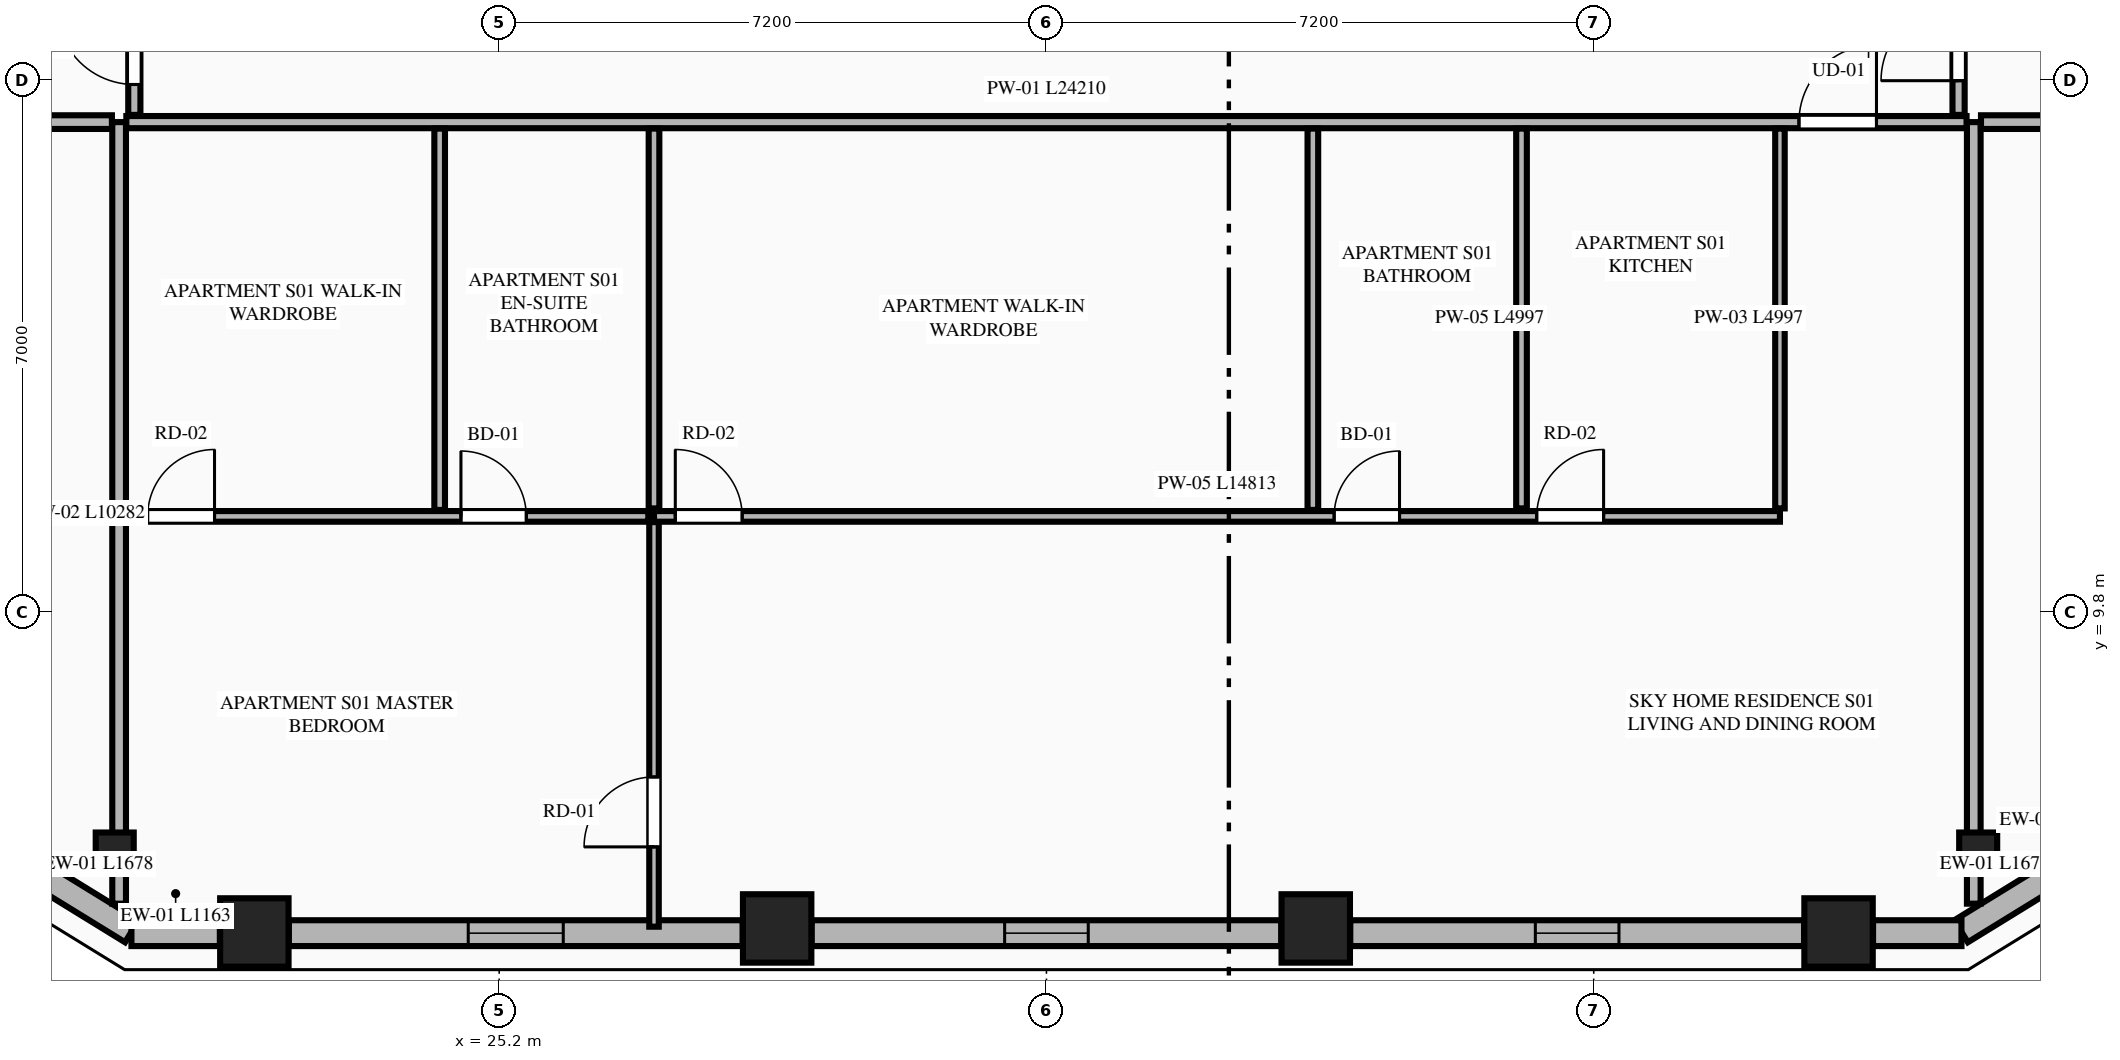
"""IFC4 building model, lengths in metres.
Left out: names, types, materials, properties, quantities, classifications, styles, units other than length and angle.
Written with IfcOpenShell. Run it as: python <this file> out.ifc"""

import sys

from ifc_helpers import new_model, si_unit, direction, frame, frame_2d, origin, origin_2d, place, context, subcontext, project, spatial, rectangle, extrude, element, fill, save


model = new_model("IFC4")
c1 = context("Model", 3, precision=1e-05, world=origin(), true_north=direction((0.0, 1.0)))
c2 = subcontext(c1, "Body", "Model", "MODEL_VIEW")
j1 = project(units=[si_unit("LENGTHUNIT", "METRE"), si_unit("PLANEANGLEUNIT", "RADIAN")], contexts=[c1])
p1 = place(None, origin())
s1 = spatial("IfcSite", under=j1, at=p1, CompositionType="ELEMENT")
p2 = place(p1, origin())
s2 = spatial("IfcBuilding", under=s1, at=p2, CompositionType="ELEMENT")
p3 = place(p2, frame((0.0, 0.0, 193.2)))
s3 = spatial("IfcBuildingStorey", under=s2, at=p3, CompositionType="ELEMENT", Elevation=193.2)
for number, where, z_axis, x_axis in (
    (1, (21.979, 5.589, 0.0), (0.0, 0.0, 1.0), (1.0, 0.0, 0.0)),
    (2, (28.857, 5.642, 0.0), (0.0, 0.0, 1.0), (1.0, 0.0, 0.0)),
    (3, (35.943, 5.642, 0.0), (0.0, 0.0, 1.0), (1.0, 0.0, 0.0)),
    (4, (42.821, 5.589, 0.0), (0.0, 0.0, 1.0), (1.0, 0.0, 0.0)),
):
    element("IfcColumn", number, at=place(p3, frame(where, z_axis=z_axis, x_axis=x_axis)), inside=s3, PredefinedType="COLUMN", context=c2, shape_type="SweptSolid", body=[
        extrude(rectangle(XDim=0.9, YDim=0.9, at=origin_2d()), origin(), (0.0, 0.0, 1.0), 3.55),
    ])
for number, where, z_axis, x_axis in (
    (5, (20.142, 6.654, 0.0), (0.0, 0.0, 1.0), (0.865, -0.501, 0.0)),
    (6, (44.658, 6.654, 0.0), (0.0, 0.0, 1.0), (0.865, 0.501, 0.0)),
):
    element("IfcColumn", number, at=place(p3, frame(where, z_axis=z_axis, x_axis=x_axis)), inside=s3, PredefinedType="PILASTER", context=c2, shape_type="SweptSolid", body=[
        extrude(rectangle(XDim=0.5, YDim=0.35, at=origin_2d()), origin(), (0.0, 0.0, 1.0), 3.55),
    ])
for number, where, z_axis, x_axis in (
    (7, (18.938, 6.484, 0.0), (0.0, 0.0, 1.0), (0.852, -0.524, 0.0)),
    (8, (44.433, 5.605, 0.0), (0.0, 0.0, 1.0), (0.852, 0.524, 0.0)),
):
    element("IfcWall", number, at=place(p3, frame(where, z_axis=z_axis, x_axis=x_axis)), inside=s3, PredefinedType="STANDARD", context=c2, shape_type="SweptSolid", body=[
        extrude(rectangle(XDim=1.678, YDim=0.34, at=frame_2d((0.839, 0.0))), origin(), (0.0, 0.0, 1.0), 3.35),
    ])
p4 = place(p3, frame((20.362, 5.58, 0.0), z_axis=(0.0, 0.0, 1.0), x_axis=(1.0, 0.0, 0.0)))
e9 = element("IfcWall", 9, at=p4, inside=s3, PredefinedType="STANDARD", context=c2, shape_type="SweptSolid", body=[
    extrude(rectangle(XDim=1.163, YDim=0.34, at=frame_2d((0.582, 0.0))), origin(), (0.0, 0.0, 1.0), 3.35),
])
p5 = place(p3, frame((22.433, 5.58, 0.0), z_axis=(0.0, 0.0, 1.0), x_axis=(1.0, 0.0, 0.0)))
e10 = element("IfcWall", 10, at=p5, inside=s3, PredefinedType="STANDARD", context=c2, shape_type="SweptSolid", body=[
    extrude(rectangle(XDim=5.97, YDim=0.34, at=frame_2d((2.985, 0.0))), origin(), (0.0, 0.0, 1.0), 2.883),
])
p6 = place(p5, frame((2.36, 0.0, 0.75)))
e11 = element("IfcOpeningElement", 11, at=p6, cuts=e10, PredefinedType="OPENING", context=c2, shape_type="SweptSolid", body=[
    extrude(rectangle(XDim=1.25, YDim=1.95, at=frame_2d((0.625, 0.975))), frame((0.0, 0.18, 0.0), z_axis=(0.0, -1.0, 0.0), x_axis=(1.0, 0.0, 0.0)), (0.0, 0.0, 1.0), 0.36),
])
p7 = place(p3, frame((29.311, 5.58, 0.0), z_axis=(0.0, 0.0, 1.0), x_axis=(1.0, 0.0, 0.0)))
e12 = element("IfcWall", 12, at=p7, inside=s3, PredefinedType="STANDARD", context=c2, shape_type="SweptSolid", body=[
    extrude(rectangle(XDim=6.178, YDim=0.34, at=frame_2d((3.089, 0.0))), origin(), (0.0, 0.0, 1.0), 2.883),
])
p8 = place(p7, frame((2.539, 0.0, 0.75)))
e13 = element("IfcOpeningElement", 13, at=p8, cuts=e12, PredefinedType="OPENING", context=c2, shape_type="SweptSolid", body=[
    extrude(rectangle(XDim=1.1, YDim=1.983, at=frame_2d((0.55, 0.991))), frame((0.0, 0.18, 0.0), z_axis=(0.0, -1.0, 0.0), x_axis=(1.0, 0.0, 0.0)), (0.0, 0.0, 1.0), 0.36),
])
p9 = place(p3, frame((36.397, 5.58, 0.0), z_axis=(0.0, 0.0, 1.0), x_axis=(1.0, 0.0, 0.0)))
e14 = element("IfcWall", 14, at=p9, inside=s3, PredefinedType="STANDARD", context=c2, shape_type="SweptSolid", body=[
    extrude(rectangle(XDim=5.97, YDim=0.34, at=frame_2d((2.985, 0.0))), origin(), (0.0, 0.0, 1.0), 2.883),
])
p10 = place(p9, frame((2.435, 0.0, 0.75)))
e15 = element("IfcOpeningElement", 15, at=p10, cuts=e14, PredefinedType="OPENING", context=c2, shape_type="SweptSolid", body=[
    extrude(rectangle(XDim=1.1, YDim=1.983, at=frame_2d((0.55, 0.991))), frame((0.0, 0.18, 0.0), z_axis=(0.0, -1.0, 0.0), x_axis=(1.0, 0.0, 0.0)), (0.0, 0.0, 1.0), 0.36),
])
p11 = place(p3, frame((43.275, 5.58, 0.0), z_axis=(0.0, 0.0, 1.0), x_axis=(1.0, 0.0, 0.0)))
e16 = element("IfcWall", 16, at=p11, inside=s3, PredefinedType="STANDARD", context=c2, shape_type="SweptSolid", body=[
    extrude(rectangle(XDim=1.163, YDim=0.34, at=frame_2d((0.582, 0.0))), origin(), (0.0, 0.0, 1.0), 3.35),
])
for number, where, z_axis, x_axis in (
    (17, (20.2, 5.968, 0.0), (0.0, 0.0, 1.0), (0.0, 1.0, 0.0)),
    (18, (44.6, 5.968, 0.0), (0.0, 0.0, 1.0), (0.0, 1.0, 0.0)),
):
    element("IfcWall", number, at=place(p3, frame(where, z_axis=z_axis, x_axis=x_axis)), inside=s3, PredefinedType="PARTITIONING", context=c2, shape_type="SweptSolid", body=[
        extrude(rectangle(XDim=10.282, YDim=0.18, at=frame_2d((5.141, 0.0))), origin(), (0.0, 0.0, 1.0), 3.35),
    ])
p12 = place(p3, frame((20.295, 16.25, 0.0), z_axis=(0.0, 0.0, 1.0), x_axis=(1.0, 0.0, 0.0)))
e19 = element("IfcWall", 19, at=p12, inside=s3, PredefinedType="PARTITIONING", context=c2, shape_type="SweptSolid", body=[
    extrude(rectangle(XDim=24.21, YDim=0.16, at=frame_2d((12.105, 0.0))), origin(), (0.0, 0.0, 1.0), 3.35),
])
p13 = place(p12, frame((22.005, 0.0, 0.0)))
e20 = element("IfcOpeningElement", 20, at=p13, cuts=e19, PredefinedType="OPENING", context=c2, shape_type="SweptSolid", body=[
    extrude(rectangle(XDim=1.02, YDim=2.25, at=frame_2d((0.51, 1.125))), frame((0.0, 0.09, 0.0), z_axis=(0.0, -1.0, 0.0), x_axis=(1.0, 0.0, 0.0)), (0.0, 0.0, 1.0), 0.18),
])
p14 = place(p3, frame((42.05, 11.168, 0.0), z_axis=(0.0, 0.0, 1.0), x_axis=(0.0, 1.0, 0.0)))
e21 = element("IfcWall", 21, at=p14, inside=s3, PredefinedType="PARTITIONING", context=c2, shape_type="SweptSolid", body=[
    extrude(rectangle(XDim=4.997, YDim=0.125, at=frame_2d((2.499, 0.0))), origin(), (0.0, 0.0, 1.0), 2.807),
])
p15 = place(p3, frame((27.237, 11.063, 0.0), z_axis=(0.0, 0.0, 1.0), x_axis=(1.0, 0.0, 0.0)))
e22 = element("IfcWall", 22, at=p15, inside=s3, PredefinedType="PLUMBINGWALL", context=c2, shape_type="SweptSolid", body=[
    extrude(rectangle(XDim=14.813, YDim=0.14, at=frame_2d((7.406, 0.0))), origin(), (0.0, 0.0, 1.0), 3.35),
])
p16 = place(p15, frame((0.28, 0.0, 0.0)))
e23 = element("IfcOpeningElement", 23, at=p16, cuts=e22, PredefinedType="OPENING", context=c2, shape_type="SweptSolid", body=[
    extrude(rectangle(XDim=0.88, YDim=2.15, at=frame_2d((0.44, 1.075))), frame((0.0, 0.08, 0.0), z_axis=(0.0, -1.0, 0.0), x_axis=(1.0, 0.0, 0.0)), (0.0, 0.0, 1.0), 0.16),
])
p17 = place(p15, frame((8.948, 0.0, 0.0)))
e24 = element("IfcOpeningElement", 24, at=p17, cuts=e22, PredefinedType="OPENING", context=c2, shape_type="SweptSolid", body=[
    extrude(rectangle(XDim=0.86, YDim=2.1, at=frame_2d((0.43, 1.05))), frame((0.0, 0.08, 0.0), z_axis=(0.0, -1.0, 0.0), x_axis=(1.0, 0.0, 0.0)), (0.0, 0.0, 1.0), 0.16),
])
p18 = place(p15, frame((11.613, 0.0, 0.0)))
e25 = element("IfcOpeningElement", 25, at=p18, cuts=e22, PredefinedType="OPENING", context=c2, shape_type="SweptSolid", body=[
    extrude(rectangle(XDim=0.88, YDim=2.15, at=frame_2d((0.44, 1.075))), frame((0.0, 0.08, 0.0), z_axis=(0.0, -1.0, 0.0), x_axis=(1.0, 0.0, 0.0)), (0.0, 0.0, 1.0), 0.16),
])
p19 = place(p3, frame((20.295, 11.063, 0.0), z_axis=(0.0, 0.0, 1.0), x_axis=(1.0, 0.0, 0.0)))
e26 = element("IfcWall", 26, at=p19, inside=s3, PredefinedType="PLUMBINGWALL", context=c2, shape_type="SweptSolid", body=[
    extrude(rectangle(XDim=6.867, YDim=0.14, at=frame_2d((3.434, 0.0))), origin(), (0.0, 0.0, 1.0), 3.35),
])
p20 = place(p19, frame((0.28, 0.0, 0.0)))
e27 = element("IfcOpeningElement", 27, at=p20, cuts=e26, PredefinedType="OPENING", context=c2, shape_type="SweptSolid", body=[
    extrude(rectangle(XDim=0.88, YDim=2.15, at=frame_2d((0.44, 1.075))), frame((0.0, 0.08, 0.0), z_axis=(0.0, -1.0, 0.0), x_axis=(1.0, 0.0, 0.0)), (0.0, 0.0, 1.0), 0.16),
])
p21 = place(p19, frame((4.402, 0.0, 0.0)))
e28 = element("IfcOpeningElement", 28, at=p21, cuts=e26, PredefinedType="OPENING", context=c2, shape_type="SweptSolid", body=[
    extrude(rectangle(XDim=0.86, YDim=2.1, at=frame_2d((0.43, 1.05))), frame((0.0, 0.08, 0.0), z_axis=(0.0, -1.0, 0.0), x_axis=(1.0, 0.0, 0.0)), (0.0, 0.0, 1.0), 0.16),
])
for number, where, z_axis, x_axis in (
    (29, (38.65, 11.168, 0.0), (0.0, 0.0, 1.0), (0.0, 1.0, 0.0)),
    (30, (27.237, 11.168, 0.0), (0.0, 0.0, 1.0), (0.0, 1.0, 0.0)),
):
    element("IfcWall", number, at=place(p3, frame(where, z_axis=z_axis, x_axis=x_axis)), inside=s3, PredefinedType="PLUMBINGWALL", context=c2, shape_type="SweptSolid", body=[
        extrude(rectangle(XDim=4.997, YDim=0.14, at=frame_2d((2.499, 0.0))), origin(), (0.0, 0.0, 1.0), 3.35),
    ])
p22 = place(p3, frame((27.237, 5.665, 0.0), z_axis=(0.0, 0.0, 1.0), x_axis=(0.0, 1.0, 0.0)))
e31 = element("IfcWall", 31, at=p22, inside=s3, PredefinedType="PARTITIONING", context=c2, shape_type="SweptSolid", body=[
    extrude(rectangle(XDim=5.323, YDim=0.125, at=frame_2d((2.662, 0.0))), origin(), (0.0, 0.0, 1.0), 3.35),
])
p23 = place(p22, frame((1.05, 0.0, 0.0)))
e32 = element("IfcOpeningElement", 32, at=p23, cuts=e31, PredefinedType="OPENING", context=c2, shape_type="SweptSolid", body=[
    extrude(rectangle(XDim=0.92, YDim=2.15, at=frame_2d((0.46, 1.075))), frame((0.0, 0.073, 0.0), z_axis=(0.0, -1.0, 0.0), x_axis=(1.0, 0.0, 0.0)), (0.0, 0.0, 1.0), 0.145),
])
p24 = place(p3, frame((35.905, 11.148, 0.0), z_axis=(0.0, 0.0, 1.0), x_axis=(0.0, 1.0, 0.0)))
e33 = element("IfcWall", 33, at=p24, inside=s3, PredefinedType="PLUMBINGWALL", context=c2, shape_type="SweptSolid", body=[
    extrude(rectangle(XDim=5.017, YDim=0.14, at=frame_2d((2.509, 0.0))), origin(), (0.0, 0.0, 1.0), 2.807),
])
p25 = place(p3, frame((24.417, 11.148, 0.0), z_axis=(0.0, 0.0, 1.0), x_axis=(0.0, 1.0, 0.0)))
e34 = element("IfcWall", 34, at=p25, inside=s3, PredefinedType="PLUMBINGWALL", context=c2, shape_type="SweptSolid", body=[
    extrude(rectangle(XDim=5.017, YDim=0.14, at=frame_2d((2.509, 0.0))), origin(), (0.0, 0.0, 1.0), 3.35),
])
for number, where, z_axis, x_axis in (
    (35, (14.211, 16.25, 0.0), (0.0, 0.0, 1.0), (1.0, 0.0, 0.0)),
    (36, (44.695, 16.25, 0.0), (0.0, 0.0, 1.0), (1.0, 0.0, 0.0)),
):
    element("IfcWall", number, at=place(p3, frame(where, z_axis=z_axis, x_axis=x_axis)), inside=s3, PredefinedType="PARTITIONING", context=c2, shape_type="SweptSolid", body=[
        extrude(rectangle(XDim=5.894, YDim=0.18, at=frame_2d((2.947, 0.0))), origin(), (0.0, 0.0, 1.0), 3.35),
    ])
p26 = place(p3, frame((20.4, 16.345, 0.0), z_axis=(0.0, 0.0, 1.0), x_axis=(0.0, 1.0, 0.0)))
e37 = element("IfcWall", 37, at=p26, inside=s3, PredefinedType="PARTITIONING", context=c2, shape_type="SweptSolid", body=[
    extrude(rectangle(XDim=10.016, YDim=0.16, at=frame_2d((5.008, 0.0))), origin(), (0.0, 0.0, 1.0), 3.35),
])
p27 = place(p26, frame((0.4, 0.0, 0.0)))
e38 = element("IfcOpeningElement", 38, at=p27, cuts=e37, PredefinedType="OPENING", context=c2, shape_type="SweptSolid", body=[
    extrude(rectangle(XDim=1.02, YDim=2.25, at=frame_2d((0.51, 1.125))), frame((0.0, 0.09, 0.0), z_axis=(0.0, -1.0, 0.0), x_axis=(1.0, 0.0, 0.0)), (0.0, 0.0, 1.0), 0.18),
])
p28 = place(p3, frame((44.4, 16.345, 0.0), z_axis=(0.0, 0.0, 1.0), x_axis=(0.0, 1.0, 0.0)))
e39 = element("IfcWall", 39, at=p28, inside=s3, PredefinedType="PARTITIONING", context=c2, shape_type="SweptSolid", body=[
    extrude(rectangle(XDim=18.71, YDim=0.16, at=frame_2d((9.355, 0.0))), origin(), (0.0, 0.0, 1.0), 3.35),
])
p29 = place(p28, frame((0.45, 0.0, 0.0)))
e40 = element("IfcOpeningElement", 40, at=p29, cuts=e39, PredefinedType="OPENING", context=c2, shape_type="SweptSolid", body=[
    extrude(rectangle(XDim=1.02, YDim=2.25, at=frame_2d((0.51, 1.125))), frame((0.0, 0.09, 0.0), z_axis=(0.0, -1.0, 0.0), x_axis=(1.0, 0.0, 0.0)), (0.0, 0.0, 1.0), 0.18),
])
p30 = place(p6, origin())
e41 = element("IfcWindow", 41, at=p30, inside=s3, PartitioningType="SINGLE_PANEL", PredefinedType="WINDOW", context=c2, shape_type="SweptSolid", body=[
    extrude(rectangle(XDim=1.25, YDim=1.95, at=frame_2d((0.625, 0.975))), frame((0.0, 0.03, 0.0), z_axis=(0.0, -1.0, 0.0), x_axis=(1.0, 0.0, 0.0)), (0.0, 0.0, 1.0), 0.06),
])
fill(e11, e41)
p31 = place(p8, origin())
e42 = element("IfcWindow", 42, at=p31, inside=s3, PartitioningType="SINGLE_PANEL", PredefinedType="WINDOW", context=c2, shape_type="SweptSolid", body=[
    extrude(rectangle(XDim=1.1, YDim=1.983, at=frame_2d((0.55, 0.991))), frame((0.0, 0.03, 0.0), z_axis=(0.0, -1.0, 0.0), x_axis=(1.0, 0.0, 0.0)), (0.0, 0.0, 1.0), 0.06),
])
fill(e13, e42)
p32 = place(p10, origin())
e43 = element("IfcWindow", 43, at=p32, inside=s3, PartitioningType="SINGLE_PANEL", PredefinedType="WINDOW", context=c2, shape_type="SweptSolid", body=[
    extrude(rectangle(XDim=1.1, YDim=1.983, at=frame_2d((0.55, 0.991))), frame((0.0, 0.03, 0.0), z_axis=(0.0, -1.0, 0.0), x_axis=(1.0, 0.0, 0.0)), (0.0, 0.0, 1.0), 0.06),
])
fill(e15, e43)
p33 = place(p16, origin())
e44 = element("IfcDoor", 44, at=p33, inside=s3, OperationType="SINGLE_SWING_LEFT", PredefinedType="DOOR", context=c2, shape_type="SweptSolid", body=[
    extrude(rectangle(XDim=0.88, YDim=2.15, at=frame_2d((0.44, 1.075))), frame((0.0, 0.025, 0.0), z_axis=(0.0, -1.0, 0.0), x_axis=(1.0, 0.0, 0.0)), (0.0, 0.0, 1.0), 0.05),
])
fill(e23, e44)
p34 = place(p17, origin())
e45 = element("IfcDoor", 45, at=p34, inside=s3, OperationType="SINGLE_SWING_RIGHT", PredefinedType="DOOR", context=c2, shape_type="SweptSolid", body=[
    extrude(rectangle(XDim=0.86, YDim=2.1, at=frame_2d((0.43, 1.05))), frame((0.0, 0.025, 0.0), z_axis=(0.0, -1.0, 0.0), x_axis=(1.0, 0.0, 0.0)), (0.0, 0.0, 1.0), 0.05),
])
fill(e24, e45)
p35 = place(p20, origin())
e46 = element("IfcDoor", 46, at=p35, inside=s3, OperationType="SINGLE_SWING_RIGHT", PredefinedType="DOOR", context=c2, shape_type="SweptSolid", body=[
    extrude(rectangle(XDim=0.88, YDim=2.15, at=frame_2d((0.44, 1.075))), frame((0.0, 0.025, 0.0), z_axis=(0.0, -1.0, 0.0), x_axis=(1.0, 0.0, 0.0)), (0.0, 0.0, 1.0), 0.05),
])
fill(e27, e46)
p36 = place(p21, origin())
e47 = element("IfcDoor", 47, at=p36, inside=s3, OperationType="SINGLE_SWING_LEFT", PredefinedType="DOOR", context=c2, shape_type="SweptSolid", body=[
    extrude(rectangle(XDim=0.86, YDim=2.1, at=frame_2d((0.43, 1.05))), frame((0.0, 0.025, 0.0), z_axis=(0.0, -1.0, 0.0), x_axis=(1.0, 0.0, 0.0)), (0.0, 0.0, 1.0), 0.05),
])
fill(e28, e47)
p37 = place(p13, origin())
e48 = element("IfcDoor", 48, at=p37, inside=s3, OperationType="SINGLE_SWING_RIGHT", PredefinedType="DOOR", context=c2, shape_type="SweptSolid", body=[
    extrude(rectangle(XDim=1.02, YDim=2.25, at=frame_2d((0.51, 1.125))), frame((0.0, 0.025, 0.0), z_axis=(0.0, -1.0, 0.0), x_axis=(1.0, 0.0, 0.0)), (0.0, 0.0, 1.0), 0.05),
])
fill(e20, e48)
p38 = place(p18, origin())
e49 = element("IfcDoor", 49, at=p38, inside=s3, OperationType="SINGLE_SWING_RIGHT", PredefinedType="DOOR", context=c2, shape_type="SweptSolid", body=[
    extrude(rectangle(XDim=0.88, YDim=2.15, at=frame_2d((0.44, 1.075))), frame((0.0, 0.025, 0.0), z_axis=(0.0, -1.0, 0.0), x_axis=(1.0, 0.0, 0.0)), (0.0, 0.0, 1.0), 0.05),
])
fill(e25, e49)
p39 = place(p23, origin())
e50 = element("IfcDoor", 50, at=p39, inside=s3, OperationType="SINGLE_SWING_LEFT", PredefinedType="DOOR", context=c2, shape_type="SweptSolid", body=[
    extrude(rectangle(XDim=0.92, YDim=2.15, at=frame_2d((0.46, 1.075))), frame((0.0, 0.025, 0.0), z_axis=(0.0, -1.0, 0.0), x_axis=(1.0, 0.0, 0.0)), (0.0, 0.0, 1.0), 0.05),
])
fill(e32, e50)
p40 = place(p27, origin())
e51 = element("IfcDoor", 51, at=p40, inside=s3, OperationType="SINGLE_SWING_RIGHT", PredefinedType="DOOR", context=c2, shape_type="SweptSolid", body=[
    extrude(rectangle(XDim=1.02, YDim=2.25, at=frame_2d((0.51, 1.125))), frame((0.0, 0.025, 0.0), z_axis=(0.0, -1.0, 0.0), x_axis=(1.0, 0.0, 0.0)), (0.0, 0.0, 1.0), 0.05),
])
fill(e38, e51)
p41 = place(p29, origin())
e52 = element("IfcDoor", 52, at=p41, inside=s3, OperationType="SINGLE_SWING_LEFT", PredefinedType="DOOR", context=c2, shape_type="SweptSolid", body=[
    extrude(rectangle(XDim=1.02, YDim=2.25, at=frame_2d((0.51, 1.125))), frame((0.0, 0.025, 0.0), z_axis=(0.0, -1.0, 0.0), x_axis=(1.0, 0.0, 0.0)), (0.0, 0.0, 1.0), 0.05),
])
fill(e40, e52)
save(model, sys.argv[1])
